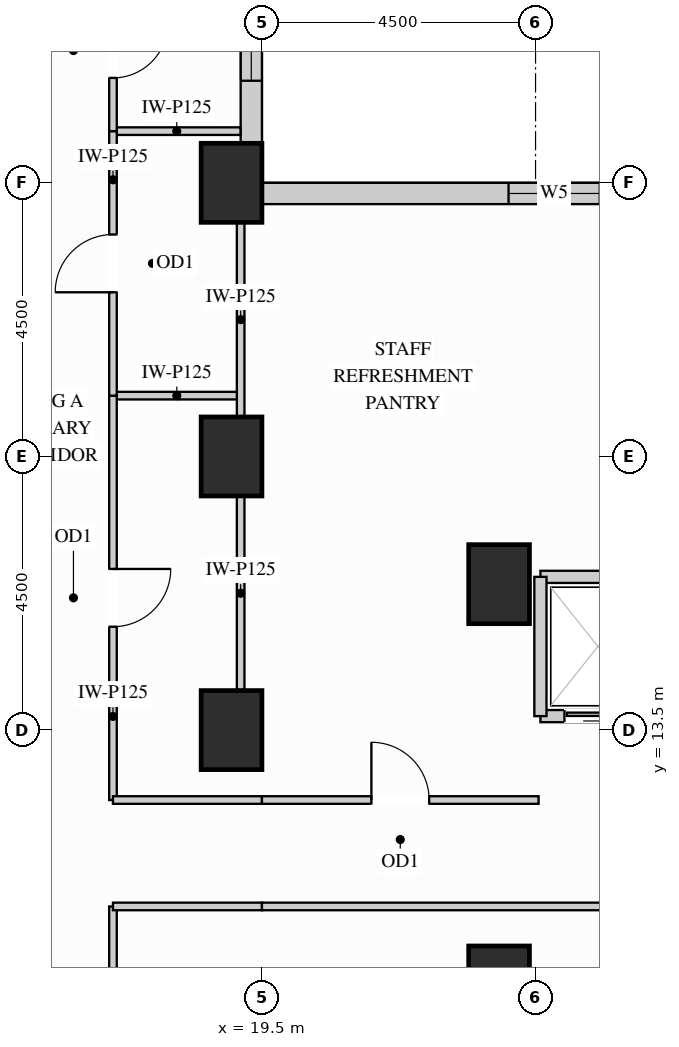
"""IFC4 building model, lengths in metres.
Left out: names, types, materials, properties, quantities, classifications, styles, units other than length and angle.
Written with IfcOpenShell. Run it as: python <this file> out.ifc"""

import sys

from ifc_helpers import new_model, si_unit, direction, frame, frame_2d, origin, origin_2d, place, context, subcontext, project, spatial, rectangle, extrude, source, transform, mapped, element, fill, save


model = new_model("IFC4")
c1 = context("Model", 3, precision=1e-05, world=origin(), true_north=direction((0.0, 1.0)))
c2 = subcontext(c1, "Body", "Model", "MODEL_VIEW")
j1 = project(units=[si_unit("LENGTHUNIT", "METRE"), si_unit("PLANEANGLEUNIT", "RADIAN")], contexts=[c1])
p1 = place(None, origin())
s1 = spatial("IfcSite", under=j1, at=p1, CompositionType="ELEMENT")
p2 = place(p1, origin())
s2 = spatial("IfcBuilding", under=s1, at=p2, CompositionType="ELEMENT")
p3 = place(p2, frame((0.0, 0.0, 54.9)))
s3 = spatial("IfcBuildingStorey", under=s2, at=p3, CompositionType="ELEMENT", Elevation=54.9)
m1 = source(origin(), c2, "Body", "SweptSolid", [
    extrude(rectangle(XDim=1.0, YDim=1.3, at=origin_2d()), origin(), (0.0, 0.0, 1.0), 3.38),
])
for number, where, z_axis, x_axis in (
    (1, (19.0, 13.5, 0.0), (0.0, 0.0, 1.0), (1.0, 0.0, 0.0)),
    (2, (19.0, 18.0, 0.0), (0.0, 0.0, 1.0), (1.0, 0.0, 0.0)),
    (3, (19.0, 22.5, 0.0), (0.0, 0.0, 1.0), (1.0, 0.0, 0.0)),
    (4, (23.4, 15.9, 0.0), (0.0, 0.0, 1.0), (1.0, 0.0, 0.0)),
    (5, (23.4, 9.3, 0.0), (0.0, 0.0, 1.0), (1.0, 0.0, 0.0)),
):
    element("IfcColumn", number, at=place(p3, frame(where, z_axis=z_axis, x_axis=x_axis)), inside=s3, PredefinedType="COLUMN", context=c2, shape_type="MappedRepresentation", body=[
        mapped(m1, transform((0.0, 0.0, 0.0), x_axis=(1.0, 0.0, 0.0), y_axis=(0.0, 1.0, 0.0), z_axis=(0.0, 0.0, 1.0))),
    ])
p4 = place(p3, frame((34.352, 22.325, 0.0), z_axis=(0.0, 0.0, 1.0), x_axis=(-1.0, 0.0, 0.0)))
e6 = element("IfcWall", 6, at=p4, inside=s3, PredefinedType="SOLIDWALL", context=c2, shape_type="SweptSolid", body=[
    extrude(rectangle(XDim=14.854, YDim=0.35, at=frame_2d((7.427, 0.0))), origin(), (0.0, 0.0, 1.0), 3.365),
])
p5 = place(p4, frame((4.058, 0.0, 0.78)))
e7 = element("IfcOpeningElement", 7, at=p5, cuts=e6, PredefinedType="OPENING", context=c2, shape_type="SweptSolid", body=[
    extrude(rectangle(XDim=1.5, YDim=2.0, at=frame_2d((0.75, 1.0))), frame((0.0, 0.185, 0.0), z_axis=(0.0, -1.0, 0.0), x_axis=(1.0, 0.0, 0.0)), (0.0, 0.0, 1.0), 0.37),
])
p6 = place(p4, frame((9.296, 0.0, 0.78)))
e8 = element("IfcOpeningElement", 8, at=p6, cuts=e6, PredefinedType="OPENING", context=c2, shape_type="SweptSolid", body=[
    extrude(rectangle(XDim=1.5, YDim=2.0, at=frame_2d((0.75, 1.0))), frame((0.0, 0.185, 0.0), z_axis=(0.0, -1.0, 0.0), x_axis=(1.0, 0.0, 0.0)), (0.0, 0.0, 1.0), 0.37),
])
p7 = place(p3, frame((19.325, 23.148, 0.0), z_axis=(0.0, 0.0, 1.0), x_axis=(0.0, 1.0, 0.0)))
e9 = element("IfcWall", 9, at=p7, inside=s3, PredefinedType="SOLIDWALL", context=c2, shape_type="SweptSolid", body=[
    extrude(rectangle(XDim=3.004, YDim=0.35, at=frame_2d((1.502, 0.0))), origin(), (0.0, 0.0, 1.0), 2.51),
])
p8 = place(p7, frame((1.031, 0.0, 0.78)))
e10 = element("IfcOpeningElement", 10, at=p8, cuts=e9, PredefinedType="OPENING", context=c2, shape_type="SweptSolid", body=[
    extrude(rectangle(XDim=1.5, YDim=1.55, at=frame_2d((0.75, 0.775))), frame((0.0, 0.185, 0.0), z_axis=(0.0, -1.0, 0.0), x_axis=(1.0, 0.0, 0.0)), (0.0, 0.0, 1.0), 0.37),
])
m2 = source(origin(), c2, "Body", "SweptSolid", [
    extrude(rectangle(XDim=2.1, YDim=0.125, at=frame_2d((1.05, 0.0))), origin(), (0.0, 0.0, 1.0), 3.365),
])
p9 = place(p3, frame((17.05, 19.0, 0.0), z_axis=(0.0, 0.0, 1.0), x_axis=(1.0, 0.0, 0.0)))
e11 = element("IfcWall", 11, at=p9, inside=s3, PredefinedType="PARTITIONING", context=c2, shape_type="MappedRepresentation", body=[
    mapped(m2, transform((0.0, 0.0, 0.0), x_axis=(1.0, 0.0, 0.0), y_axis=(0.0, 1.0, 0.0), z_axis=(0.0, 0.0, 1.0))),
])
m3 = source(origin(), c2, "Body", "SweptSolid", [
    extrude(rectangle(XDim=2.098, YDim=0.125, at=frame_2d((1.049, 0.0))), origin(), (0.0, 0.0, 1.0), 3.365),
])
p10 = place(p3, frame((17.05, 23.35, 0.0), z_axis=(0.0, 0.0, 1.0), x_axis=(1.0, 0.0, 0.0)))
e12 = element("IfcWall", 12, at=p10, inside=s3, PredefinedType="PARTITIONING", context=c2, shape_type="MappedRepresentation", body=[
    mapped(m3, transform((0.0, 0.0, 0.0), x_axis=(1.0, 0.0, 0.0), y_axis=(0.0, 1.0, 0.0), z_axis=(0.0, 0.0, 1.0))),
])
m4 = source(origin(), c2, "Body", "SweptSolid", [
    extrude(rectangle(XDim=3.18, YDim=0.125, at=frame_2d((1.59, 0.0))), origin(), (0.0, 0.0, 1.0), 2.67),
])
for number, where, z_axis, x_axis in (
    (13, (19.15, 14.16, 0.0), (0.0, 0.0, 1.0), (0.0, 1.0, 0.0)),
    (14, (19.15, 18.66, 0.0), (0.0, 0.0, 1.0), (0.0, 1.0, 0.0)),
):
    element("IfcWall", number, at=place(p3, frame(where, z_axis=z_axis, x_axis=x_axis)), inside=s3, PredefinedType="PARTITIONING", context=c2, shape_type="MappedRepresentation", body=[
        mapped(m4, transform((0.0, 0.0, 0.0), x_axis=(1.0, 0.0, 0.0), y_axis=(0.0, 1.0, 0.0), z_axis=(0.0, 0.0, 1.0))),
    ])
p11 = place(p3, frame((17.05, 12.35, 0.0), z_axis=(0.0, 0.0, 1.0), x_axis=(0.0, 1.0, 0.0)))
e15 = element("IfcWall", 15, at=p11, inside=s3, PredefinedType="PARTITIONING", context=c2, shape_type="SweptSolid", body=[
    extrude(rectangle(XDim=6.65, YDim=0.125, at=frame_2d((3.325, 0.0))), origin(), (0.0, 0.0, 1.0), 3.365),
])
p12 = place(p11, frame((2.85, 0.0, 0.0)))
e16 = element("IfcOpeningElement", 16, at=p12, cuts=e15, PredefinedType="OPENING", context=c2, shape_type="SweptSolid", body=[
    extrude(rectangle(XDim=0.95, YDim=2.15, at=frame_2d((0.475, 1.075))), frame((0.0, 0.073, 0.0), z_axis=(0.0, -1.0, 0.0), x_axis=(1.0, 0.0, 0.0)), (0.0, 0.0, 1.0), 0.145),
])
p13 = place(p3, frame((17.05, 19.0, 0.0), z_axis=(0.0, 0.0, 1.0), x_axis=(0.0, 1.0, 0.0)))
e17 = element("IfcWall", 17, at=p13, inside=s3, PredefinedType="PARTITIONING", context=c2, shape_type="SweptSolid", body=[
    extrude(rectangle(XDim=4.35, YDim=0.125, at=frame_2d((2.175, 0.0))), origin(), (0.0, 0.0, 1.0), 3.365),
])
p14 = place(p13, frame((1.7, 0.0, 0.0)))
e18 = element("IfcOpeningElement", 18, at=p14, cuts=e17, PredefinedType="OPENING", context=c2, shape_type="SweptSolid", body=[
    extrude(rectangle(XDim=0.95, YDim=2.15, at=frame_2d((0.475, 1.075))), frame((0.0, 0.073, 0.0), z_axis=(0.0, -1.0, 0.0), x_axis=(1.0, 0.0, 0.0)), (0.0, 0.0, 1.0), 0.145),
])
p15 = place(p3, frame((17.05, 4.85, 0.0), z_axis=(0.0, 0.0, 1.0), x_axis=(0.0, 1.0, 0.0)))
e19 = element("IfcWall", 19, at=p15, inside=s3, PredefinedType="PARTITIONING", context=c2, shape_type="SweptSolid", body=[
    extrude(rectangle(XDim=5.75, YDim=0.125, at=frame_2d((2.875, 0.0))), origin(), (0.0, 0.0, 1.0), 3.365),
])
p16 = place(p15, frame((2.4, 0.0, 0.0)))
e20 = element("IfcOpeningElement", 20, at=p16, cuts=e19, PredefinedType="OPENING", context=c2, shape_type="SweptSolid", body=[
    extrude(rectangle(XDim=0.95, YDim=2.15, at=frame_2d((0.475, 1.075))), frame((0.0, 0.073, 0.0), z_axis=(0.0, -1.0, 0.0), x_axis=(1.0, 0.0, 0.0)), (0.0, 0.0, 1.0), 0.145),
])
p17 = place(p3, frame((17.05, 23.35, 0.0), z_axis=(0.0, 0.0, 1.0), x_axis=(0.0, 1.0, 0.0)))
e21 = element("IfcWall", 21, at=p17, inside=s3, PredefinedType="PARTITIONING", context=c2, shape_type="SweptSolid", body=[
    extrude(rectangle(XDim=2.7, YDim=0.125, at=frame_2d((1.35, 0.0))), origin(), (0.0, 0.0, 1.0), 3.365),
])
p18 = place(p17, frame((0.875, 0.0, 0.0)))
e22 = element("IfcOpeningElement", 22, at=p18, cuts=e21, PredefinedType="OPENING", context=c2, shape_type="SweptSolid", body=[
    extrude(rectangle(XDim=0.9, YDim=2.15, at=frame_2d((0.45, 1.075))), frame((0.0, 0.073, 0.0), z_axis=(0.0, -1.0, 0.0), x_axis=(1.0, 0.0, 0.0)), (0.0, 0.0, 1.0), 0.145),
])
m5 = source(origin(), c2, "Body", "SweptSolid", [
    extrude(rectangle(XDim=2.45, YDim=0.125, at=frame_2d((1.225, 0.0))), origin(), (0.0, 0.0, 1.0), 3.365),
])
p19 = place(p3, frame((17.05, 12.35, 0.0), z_axis=(0.0, 0.0, 1.0), x_axis=(1.0, 0.0, 0.0)))
e23 = element("IfcWall", 23, at=p19, inside=s3, PredefinedType="PARTITIONING", context=c2, shape_type="MappedRepresentation", body=[
    mapped(m5, transform((0.0, 0.0, 0.0), x_axis=(1.0, 0.0, 0.0), y_axis=(0.0, 1.0, 0.0), z_axis=(0.0, 0.0, 1.0))),
])
p20 = place(p3, frame((19.5, 12.35, 0.0), z_axis=(0.0, 0.0, 1.0), x_axis=(1.0, 0.0, 0.0)))
e24 = element("IfcWall", 24, at=p20, inside=s3, PredefinedType="PARTITIONING", context=c2, shape_type="SweptSolid", body=[
    extrude(rectangle(XDim=4.55, YDim=0.125, at=frame_2d((2.275, 0.0))), origin(), (0.0, 0.0, 1.0), 3.365),
])
p21 = place(p20, frame((1.8, 0.0, 0.0)))
e25 = element("IfcOpeningElement", 25, at=p21, cuts=e24, PredefinedType="OPENING", context=c2, shape_type="SweptSolid", body=[
    extrude(rectangle(XDim=0.95, YDim=2.15, at=frame_2d((0.475, 1.075))), frame((0.0, 0.073, 0.0), z_axis=(0.0, -1.0, 0.0), x_axis=(1.0, 0.0, 0.0)), (0.0, 0.0, 1.0), 0.145),
])
p22 = place(p3, frame((17.05, 10.6, 0.0), z_axis=(0.0, 0.0, 1.0), x_axis=(1.0, 0.0, 0.0)))
e26 = element("IfcWall", 26, at=p22, inside=s3, PredefinedType="PARTITIONING", context=c2, shape_type="MappedRepresentation", body=[
    mapped(m5, transform((0.0, 0.0, 0.0), x_axis=(1.0, 0.0, 0.0), y_axis=(0.0, 1.0, 0.0), z_axis=(0.0, 0.0, 1.0))),
])
p23 = place(p3, frame((19.5, 10.6, 0.0), z_axis=(0.0, 0.0, 1.0), x_axis=(1.0, 0.0, 0.0)))
e27 = element("IfcWall", 27, at=p23, inside=s3, PredefinedType="PARTITIONING", context=c2, shape_type="SweptSolid", body=[
    extrude(rectangle(XDim=14.9, YDim=0.125, at=frame_2d((7.45, 0.0))), origin(), (0.0, 0.0, 1.0), 3.365),
])
p24 = place(p23, frame((6.975, 0.0, 0.0)))
e28 = element("IfcOpeningElement", 28, at=p24, cuts=e27, PredefinedType="OPENING", context=c2, shape_type="SweptSolid", body=[
    extrude(rectangle(XDim=0.95, YDim=2.15, at=frame_2d((0.475, 1.075))), frame((0.0, 0.073, 0.0), z_axis=(0.0, -1.0, 0.0), x_axis=(1.0, 0.0, 0.0)), (0.0, 0.0, 1.0), 0.145),
])
m6 = source(origin(), c2, "Body", "SweptSolid", [
    extrude(rectangle(XDim=1.89, YDim=0.2, at=frame_2d((0.945, 0.0))), origin(), (0.0, 0.0, 1.0), 2.67),
])
p25 = place(p3, frame((24.08, 16.02, 0.0), z_axis=(0.0, 0.0, 1.0), x_axis=(1.0, 0.0, 0.0)))
e29 = element("IfcWall", 29, at=p25, inside=s3, PredefinedType="PARTITIONING", context=c2, shape_type="MappedRepresentation", body=[
    mapped(m6, transform((0.0, 0.0, 0.0), x_axis=(1.0, 0.0, 0.0), y_axis=(0.0, 1.0, 0.0), z_axis=(0.0, 0.0, 1.0))),
])
p26 = place(p3, frame((24.08, 13.73, 0.0), z_axis=(0.0, 0.0, 1.0), x_axis=(1.0, 0.0, 0.0)))
e30 = element("IfcWall", 30, at=p26, inside=s3, PredefinedType="PARTITIONING", context=c2, shape_type="SweptSolid", body=[
    extrude(rectangle(XDim=1.89, YDim=0.2, at=frame_2d((0.945, 0.0))), origin(), (0.0, 0.0, 1.0), 2.446),
])
p27 = place(p26, frame((0.395, 0.0, 0.0)))
e31 = element("IfcOpeningElement", 31, at=p27, cuts=e30, PredefinedType="OPENING", context=c2, shape_type="SweptSolid", body=[
    extrude(rectangle(XDim=1.1, YDim=2.2, at=frame_2d((0.55, 1.1))), frame((0.0, 0.11, 0.0), z_axis=(0.0, -1.0, 0.0), x_axis=(1.0, 0.0, 0.0)), (0.0, 0.0, 1.0), 0.22),
])
m7 = source(origin(), c2, "Body", "SweptSolid", [
    extrude(rectangle(XDim=2.29, YDim=0.2, at=frame_2d((1.145, 0.0))), origin(), (0.0, 0.0, 1.0), 3.365),
])
p28 = place(p3, frame((24.08, 13.73, 0.0), z_axis=(0.0, 0.0, 1.0), x_axis=(0.0, 1.0, 0.0)))
e32 = element("IfcWall", 32, at=p28, inside=s3, PredefinedType="PARTITIONING", context=c2, shape_type="MappedRepresentation", body=[
    mapped(m7, transform((0.0, 0.0, 0.0), x_axis=(1.0, 0.0, 0.0), y_axis=(0.0, 1.0, 0.0), z_axis=(0.0, 0.0, 1.0))),
])
m8 = source(origin(), c2, "Body", "SweptSolid", [
    extrude(rectangle(XDim=1.1, YDim=2.2, at=frame_2d((0.55, 1.1))), frame((0.0, 0.025, 0.0), z_axis=(0.0, -1.0, 0.0), x_axis=(1.0, 0.0, 0.0)), (0.0, 0.0, 1.0), 0.05),
])
p29 = place(p27, origin())
e33 = element("IfcDoor", 33, at=p29, inside=s3, OperationType="SLIDING_TO_LEFT", PredefinedType="DOOR", context=c2, shape_type="MappedRepresentation", body=[
    mapped(m8, transform((0.0, 0.0, 0.0), x_axis=(1.0, 0.0, 0.0), y_axis=(0.0, 1.0, 0.0), z_axis=(0.0, 0.0, 1.0))),
])
fill(e31, e33)
m9 = source(origin(), c2, "Body", "SweptSolid", [
    extrude(rectangle(XDim=0.95, YDim=2.15, at=frame_2d((0.475, 1.075))), frame((0.0, 0.025, 0.0), z_axis=(0.0, -1.0, 0.0), x_axis=(1.0, 0.0, 0.0)), (0.0, 0.0, 1.0), 0.05),
])
p30 = place(p12, origin())
e34 = element("IfcDoor", 34, at=p30, inside=s3, OperationType="SINGLE_SWING_RIGHT", PredefinedType="DOOR", context=c2, shape_type="MappedRepresentation", body=[
    mapped(m9, transform((0.0, 0.0, 0.0), x_axis=(1.0, 0.0, 0.0), y_axis=(0.0, 1.0, 0.0), z_axis=(0.0, 0.0, 1.0))),
])
fill(e16, e34)
p31 = place(p14, origin())
e35 = element("IfcDoor", 35, at=p31, inside=s3, OperationType="SINGLE_SWING_LEFT", PredefinedType="DOOR", context=c2, shape_type="MappedRepresentation", body=[
    mapped(m9, transform((0.0, 0.0, 0.0), x_axis=(1.0, 0.0, 0.0), y_axis=(0.0, 1.0, 0.0), z_axis=(0.0, 0.0, 1.0))),
])
fill(e18, e35)
p32 = place(p21, origin())
e36 = element("IfcDoor", 36, at=p32, inside=s3, OperationType="SINGLE_SWING_LEFT", PredefinedType="DOOR", context=c2, shape_type="MappedRepresentation", body=[
    mapped(m9, transform((0.0, 0.0, 0.0), x_axis=(1.0, 0.0, 0.0), y_axis=(0.0, 1.0, 0.0), z_axis=(0.0, 0.0, 1.0))),
])
fill(e25, e36)
m10 = source(origin(), c2, "Body", "SweptSolid", [
    extrude(rectangle(XDim=0.9, YDim=2.15, at=frame_2d((0.45, 1.075))), frame((0.0, 0.025, 0.0), z_axis=(0.0, -1.0, 0.0), x_axis=(1.0, 0.0, 0.0)), (0.0, 0.0, 1.0), 0.05),
])
p33 = place(p18, origin())
e37 = element("IfcDoor", 37, at=p33, inside=s3, OperationType="SINGLE_SWING_RIGHT", PredefinedType="DOOR", context=c2, shape_type="MappedRepresentation", body=[
    mapped(m10, transform((0.0, 0.0, 0.0), x_axis=(1.0, 0.0, 0.0), y_axis=(0.0, 1.0, 0.0), z_axis=(0.0, 0.0, 1.0))),
])
fill(e22, e37)
m11 = source(origin(), c2, "Body", "SweptSolid", [
    extrude(rectangle(XDim=1.5, YDim=2.0, at=frame_2d((0.75, 1.0))), frame((0.0, 0.03, 0.0), z_axis=(0.0, -1.0, 0.0), x_axis=(1.0, 0.0, 0.0)), (0.0, 0.0, 1.0), 0.06),
])
p34 = place(p6, origin())
e38 = element("IfcWindow", 38, at=p34, inside=s3, PartitioningType="SINGLE_PANEL", PredefinedType="WINDOW", context=c2, shape_type="MappedRepresentation", body=[
    mapped(m11, transform((0.0, 0.0, 0.0), x_axis=(1.0, 0.0, 0.0), y_axis=(0.0, 1.0, 0.0), z_axis=(0.0, 0.0, 1.0))),
])
fill(e8, e38)
m12 = source(origin(), c2, "Body", "SweptSolid", [
    extrude(rectangle(XDim=1.5, YDim=1.55, at=frame_2d((0.75, 0.775))), frame((0.0, 0.03, 0.0), z_axis=(0.0, -1.0, 0.0), x_axis=(1.0, 0.0, 0.0)), (0.0, 0.0, 1.0), 0.06),
])
p35 = place(p8, origin())
e39 = element("IfcWindow", 39, at=p35, inside=s3, PartitioningType="SINGLE_PANEL", PredefinedType="WINDOW", context=c2, shape_type="MappedRepresentation", body=[
    mapped(m12, transform((0.0, 0.0, 0.0), x_axis=(1.0, 0.0, 0.0), y_axis=(0.0, 1.0, 0.0), z_axis=(0.0, 0.0, 1.0))),
])
fill(e10, e39)
save(model, sys.argv[1])
